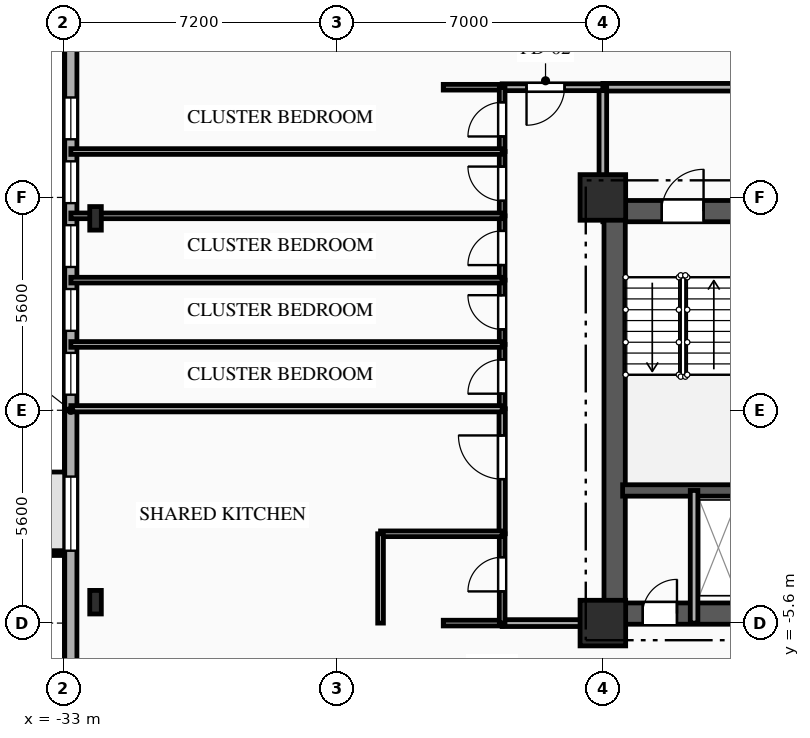
"""IFC4 building model, lengths in metres.
Left out: names, types, materials, properties, quantities, classifications, styles, units other than length and angle.
Written with IfcOpenShell. Run it as: python <this file> out.ifc"""

import sys

from ifc_helpers import new_model, si_unit, direction, frame, frame_2d, origin, origin_2d, place, context, subcontext, project, spatial, rectangle, i_section, extrude, element, fill, save


model = new_model("IFC4")
c1 = context("Model", 3, precision=1e-05, world=origin(), true_north=direction((0.0, 1.0)))
c2 = subcontext(c1, "Body", "Model", "MODEL_VIEW")
j1 = project(units=[si_unit("LENGTHUNIT", "METRE"), si_unit("PLANEANGLEUNIT", "RADIAN")], contexts=[c1])
p1 = place(None, origin())
s1 = spatial("IfcSite", under=j1, at=p1, CompositionType="ELEMENT")
p2 = place(p1, origin())
s2 = spatial("IfcBuilding", under=s1, at=p2, CompositionType="ELEMENT")
p3 = place(p2, frame((0.0, 0.0, 30.35)))
s3 = spatial("IfcBuildingStorey", under=s2, at=p3, CompositionType="ELEMENT", Elevation=30.35)
for number, where, z_axis, x_axis in (
    (1, (-18.8, -5.6, 0.0), (0.0, 0.0, 1.0), (1.0, 0.0, 0.0)),
    (2, (-18.8, 5.6, 0.0), (0.0, 0.0, 1.0), (1.0, 0.0, 0.0)),
):
    element("IfcColumn", number, at=place(p3, frame(where, z_axis=z_axis, x_axis=x_axis)), inside=s3, PredefinedType="COLUMN", context=c2, shape_type="SweptSolid", body=[
        extrude(rectangle(XDim=1.2, YDim=1.2, at=origin_2d()), origin(), (0.0, 0.0, 1.0), 3.35),
    ])
for number, where, z_axis, x_axis in (
    (3, (-32.15, 5.05, 0.0), (0.0, 0.0, 1.0), (1.0, 0.0, 0.0)),
    (4, (-32.15, -5.05, 0.0), (0.0, 0.0, 1.0), (1.0, 0.0, 0.0)),
):
    element("IfcColumn", number, at=place(p3, frame(where, z_axis=z_axis, x_axis=x_axis)), inside=s3, PredefinedType="COLUMN", context=c2, shape_type="SweptSolid", body=[
        extrude(i_section(OverallWidth=0.305, OverallDepth=0.62, WebThickness=0.021, FlangeThickness=0.04, FilletRadius=0.027, at=origin_2d()), origin(), (0.0, 0.0, 1.0), 3.35),
    ])
p4 = place(p3, frame((-32.8, -15.8, 0.0), z_axis=(0.0, 0.0, 1.0), x_axis=(0.0, 1.0, 0.0)))
e5 = element("IfcWall", 5, at=p4, inside=s3, PredefinedType="SOLIDWALL", context=c2, shape_type="SweptSolid", body=[
    extrude(rectangle(XDim=31.6, YDim=0.32, at=frame_2d((15.8, 0.0))), origin(), (0.0, 0.0, 1.0), 3.035),
])
p5 = place(p4, frame((12.105, 0.0, 0.85)))
e6 = element("IfcOpeningElement", 6, at=p5, cuts=e5, PredefinedType="OPENING", context=c2, shape_type="SweptSolid", body=[
    extrude(rectangle(XDim=1.95, YDim=1.85, at=frame_2d((0.975, 0.925))), frame((0.0, 0.17, 0.0), z_axis=(0.0, -1.0, 0.0), x_axis=(1.0, 0.0, 0.0)), (0.0, 0.0, 1.0), 0.34),
])
p6 = place(p4, frame((16.21, 0.0, 0.85)))
e7 = element("IfcOpeningElement", 7, at=p6, cuts=e5, PredefinedType="OPENING", context=c2, shape_type="SweptSolid", body=[
    extrude(rectangle(XDim=1.1, YDim=1.85, at=frame_2d((0.55, 0.925))), frame((0.0, 0.17, 0.0), z_axis=(0.0, -1.0, 0.0), x_axis=(1.0, 0.0, 0.0)), (0.0, 0.0, 1.0), 0.34),
])
p7 = place(p4, frame((17.89, 0.0, 0.85)))
e8 = element("IfcOpeningElement", 8, at=p7, cuts=e5, PredefinedType="OPENING", context=c2, shape_type="SweptSolid", body=[
    extrude(rectangle(XDim=1.1, YDim=1.85, at=frame_2d((0.55, 0.925))), frame((0.0, 0.17, 0.0), z_axis=(0.0, -1.0, 0.0), x_axis=(1.0, 0.0, 0.0)), (0.0, 0.0, 1.0), 0.34),
])
p8 = place(p4, frame((19.57, 0.0, 0.85)))
e9 = element("IfcOpeningElement", 9, at=p8, cuts=e5, PredefinedType="OPENING", context=c2, shape_type="SweptSolid", body=[
    extrude(rectangle(XDim=1.1, YDim=1.85, at=frame_2d((0.55, 0.925))), frame((0.0, 0.17, 0.0), z_axis=(0.0, -1.0, 0.0), x_axis=(1.0, 0.0, 0.0)), (0.0, 0.0, 1.0), 0.34),
])
p9 = place(p4, frame((21.25, 0.0, 0.85)))
e10 = element("IfcOpeningElement", 10, at=p9, cuts=e5, PredefinedType="OPENING", context=c2, shape_type="SweptSolid", body=[
    extrude(rectangle(XDim=1.1, YDim=1.85, at=frame_2d((0.55, 0.925))), frame((0.0, 0.17, 0.0), z_axis=(0.0, -1.0, 0.0), x_axis=(1.0, 0.0, 0.0)), (0.0, 0.0, 1.0), 0.34),
])
p10 = place(p4, frame((22.93, 0.0, 0.85)))
e11 = element("IfcOpeningElement", 11, at=p10, cuts=e5, PredefinedType="OPENING", context=c2, shape_type="SweptSolid", body=[
    extrude(rectangle(XDim=1.1, YDim=1.85, at=frame_2d((0.55, 0.925))), frame((0.0, 0.17, 0.0), z_axis=(0.0, -1.0, 0.0), x_axis=(1.0, 0.0, 0.0)), (0.0, 0.0, 1.0), 0.34),
])
p11 = place(p3, frame((-18.8, 5.24, 0.0), z_axis=(0.0, 0.0, 1.0), x_axis=(1.0, 0.0, 0.0)))
e12 = element("IfcWall", 12, at=p11, inside=s3, PredefinedType="SHEAR", context=c2, shape_type="SweptSolid", body=[
    extrude(rectangle(XDim=9.6, YDim=0.56, at=frame_2d((4.8, 0.0))), origin(), (0.0, 0.0, 1.0), 3.035),
])
p12 = place(p11, frame((1.55, 0.0, 0.0)))
e13 = element("IfcOpeningElement", 13, at=p12, cuts=e12, PredefinedType="OPENING", context=c2, shape_type="SweptSolid", body=[
    extrude(rectangle(XDim=1.1, YDim=2.15, at=frame_2d((0.55, 1.075))), frame((0.0, 0.29, 0.0), z_axis=(0.0, -1.0, 0.0), x_axis=(1.0, 0.0, 0.0)), (0.0, 0.0, 1.0), 0.58),
])
p13 = place(p11, frame((4.775, 0.0, 0.0)))
e14 = element("IfcOpeningElement", 14, at=p13, cuts=e12, PredefinedType="OPENING", context=c2, shape_type="SweptSolid", body=[
    extrude(rectangle(XDim=1.05, YDim=2.1, at=frame_2d((0.525, 1.05))), frame((0.0, 0.29, 0.0), z_axis=(0.0, -1.0, 0.0), x_axis=(1.0, 0.0, 0.0)), (0.0, 0.0, 1.0), 0.58),
])
p14 = place(p3, frame((-18.8, -5.35, 0.0), z_axis=(0.0, 0.0, 1.0), x_axis=(1.0, 0.0, 0.0)))
e15 = element("IfcWall", 15, at=p14, inside=s3, PredefinedType="SHEAR", context=c2, shape_type="SweptSolid", body=[
    extrude(rectangle(XDim=9.6, YDim=0.56, at=frame_2d((4.8, 0.0))), origin(), (0.0, 0.0, 1.0), 3.035),
])
p15 = place(p14, frame((1.05, 0.0, 0.0)))
e16 = element("IfcOpeningElement", 16, at=p15, cuts=e15, PredefinedType="OPENING", context=c2, shape_type="SweptSolid", body=[
    extrude(rectangle(XDim=0.9, YDim=2.1, at=frame_2d((0.45, 1.05))), frame((0.0, 0.29, 0.0), z_axis=(0.0, -1.0, 0.0), x_axis=(1.0, 0.0, 0.0)), (0.0, 0.0, 1.0), 0.58),
])
p16 = place(p3, frame((-18.49, -5.05, 0.0), z_axis=(0.0, 0.0, 1.0), x_axis=(0.0, 1.0, 0.0)))
e17 = element("IfcWall", 17, at=p16, inside=s3, PredefinedType="SHEAR", context=c2, shape_type="SweptSolid", body=[
    extrude(rectangle(XDim=10.1, YDim=0.56, at=frame_2d((5.05, 0.0))), origin(), (0.0, 0.0, 1.0), 3.035),
])
p17 = place(p3, frame((-18.28, -2.11, 0.0), z_axis=(0.0, 0.0, 1.0), x_axis=(1.0, 0.0, 0.0)))
e18 = element("IfcWall", 18, at=p17, inside=s3, PredefinedType="SHEAR", context=c2, shape_type="SweptSolid", body=[
    extrude(rectangle(XDim=3.18, YDim=0.3, at=frame_2d((1.59, 0.0))), origin(), (0.0, 0.0, 1.0), 3.035),
])
p18 = place(p3, frame((-16.4, -5.6, 0.0), z_axis=(0.0, 0.0, 1.0), x_axis=(0.0, 1.0, 0.0)))
e19 = element("IfcWall", 19, at=p18, inside=s3, PredefinedType="PARTITIONING", context=c2, shape_type="SweptSolid", body=[
    extrude(rectangle(XDim=3.49, YDim=0.2, at=frame_2d((1.745, 0.0))), origin(), (0.0, 0.0, 1.0), 3.035),
])
p19 = place(p3, frame((-12.0, 8.5, 0.0), z_axis=(0.0, 0.0, 1.0), x_axis=(-1.0, 0.0, 0.0)))
e20 = element("IfcWall", 20, at=p19, inside=s3, PredefinedType="PARTITIONING", context=c2, shape_type="SweptSolid", body=[
    extrude(rectangle(XDim=6.8, YDim=0.2, at=frame_2d((3.4, 0.0))), origin(), (0.0, 0.0, 1.0), 3.035),
])
p20 = place(p19, frame((1.715, 0.0, 0.0)))
e21 = element("IfcOpeningElement", 21, at=p20, cuts=e20, PredefinedType="OPENING", context=c2, shape_type="SweptSolid", body=[
    extrude(rectangle(XDim=1.1, YDim=2.15, at=frame_2d((0.55, 1.075))), frame((0.0, 0.11, 0.0), z_axis=(0.0, -1.0, 0.0), x_axis=(1.0, 0.0, 0.0)), (0.0, 0.0, 1.0), 0.22),
])
p21 = place(p3, frame((-18.8, 8.5, 0.0), z_axis=(0.0, 0.0, 1.0), x_axis=(0.0, -1.0, 0.0)))
e22 = element("IfcWall", 22, at=p21, inside=s3, PredefinedType="PARTITIONING", context=c2, shape_type="SweptSolid", body=[
    extrude(rectangle(XDim=2.9, YDim=0.2, at=frame_2d((1.45, 0.0))), origin(), (0.0, 0.0, 1.0), 2.52),
])
p22 = place(p3, frame((-18.8, 8.5, 0.0), z_axis=(0.0, 0.0, 1.0), x_axis=(-1.0, 0.0, 0.0)))
e23 = element("IfcWall", 23, at=p22, inside=s3, PredefinedType="PARTITIONING", context=c2, shape_type="SweptSolid", body=[
    extrude(rectangle(XDim=2.65, YDim=0.18, at=frame_2d((1.325, 0.0))), origin(), (0.0, 0.0, 1.0), 3.035),
])
p23 = place(p22, frame((1.009, 0.0, 0.0)))
e24 = element("IfcOpeningElement", 24, at=p23, cuts=e23, PredefinedType="OPENING", context=c2, shape_type="SweptSolid", body=[
    extrude(rectangle(XDim=1.0, YDim=2.15, at=frame_2d((0.5, 1.075))), frame((0.0, 0.1, 0.0), z_axis=(0.0, -1.0, 0.0), x_axis=(1.0, 0.0, 0.0)), (0.0, 0.0, 1.0), 0.2),
])
p24 = place(p3, frame((-21.45, 8.5, 0.0), z_axis=(0.0, 0.0, 1.0), x_axis=(-1.0, 0.0, 0.0)))
e25 = element("IfcWall", 25, at=p24, inside=s3, PredefinedType="PARTITIONING", context=c2, shape_type="SweptSolid", body=[
    extrude(rectangle(XDim=1.55, YDim=0.15, at=frame_2d((0.775, 0.0))), origin(), (0.0, 0.0, 1.0), 3.035),
])
p25 = place(p3, frame((-21.45, -5.6, 0.0), z_axis=(0.0, 0.0, 1.0), x_axis=(1.0, 0.0, 0.0)))
e26 = element("IfcWall", 26, at=p25, inside=s3, PredefinedType="PARTITIONING", context=c2, shape_type="SweptSolid", body=[
    extrude(rectangle(XDim=2.65, YDim=0.18, at=frame_2d((1.325, 0.0))), origin(), (0.0, 0.0, 1.0), 3.035),
])
p26 = place(p3, frame((-23.0, -5.6, 0.0), z_axis=(0.0, 0.0, 1.0), x_axis=(1.0, 0.0, 0.0)))
e27 = element("IfcWall", 27, at=p26, inside=s3, PredefinedType="PLUMBINGWALL", context=c2, shape_type="SweptSolid", body=[
    extrude(rectangle(XDim=1.55, YDim=0.15, at=frame_2d((0.775, 0.0))), origin(), (0.0, 0.0, 1.0), 3.035),
])
p27 = place(p3, frame((-21.45, -5.6, 0.0), z_axis=(0.0, 0.0, 1.0), x_axis=(0.0, 1.0, 0.0)))
e28 = element("IfcWall", 28, at=p27, inside=s3, PredefinedType="PLUMBINGWALL", context=c2, shape_type="SweptSolid", body=[
    extrude(rectangle(XDim=2.35, YDim=0.15, at=frame_2d((1.175, 0.0))), origin(), (0.0, 0.0, 1.0), 3.035),
])
p28 = place(p27, frame((0.834, 0.0, 0.0)))
e29 = element("IfcOpeningElement", 29, at=p28, cuts=e28, PredefinedType="OPENING", context=c2, shape_type="SweptSolid", body=[
    extrude(rectangle(XDim=0.9, YDim=2.1, at=frame_2d((0.45, 1.05))), frame((0.0, 0.085, 0.0), z_axis=(0.0, -1.0, 0.0), x_axis=(1.0, 0.0, 0.0)), (0.0, 0.0, 1.0), 0.17),
])
p29 = place(p3, frame((-21.45, -3.25, 0.0), z_axis=(0.0, 0.0, 1.0), x_axis=(0.0, 1.0, 0.0)))
e30 = element("IfcWall", 30, at=p29, inside=s3, PredefinedType="PARTITIONING", context=c2, shape_type="SweptSolid", body=[
    extrude(rectangle(XDim=3.29, YDim=0.165, at=frame_2d((1.645, 0.0))), origin(), (0.0, 0.0, 1.0), 3.035),
])
p30 = place(p29, frame((1.438, 0.0, 0.0)))
e31 = element("IfcOpeningElement", 31, at=p30, cuts=e30, PredefinedType="OPENING", context=c2, shape_type="SweptSolid", body=[
    extrude(rectangle(XDim=1.15, YDim=2.15, at=frame_2d((0.575, 1.075))), frame((0.0, 0.093, 0.0), z_axis=(0.0, -1.0, 0.0), x_axis=(1.0, 0.0, 0.0)), (0.0, 0.0, 1.0), 0.185),
])
p31 = place(p3, frame((-21.45, 0.04, 0.0), z_axis=(0.0, 0.0, 1.0), x_axis=(0.0, 1.0, 0.0)))
e32 = element("IfcWall", 32, at=p31, inside=s3, PredefinedType="PARTITIONING", context=c2, shape_type="SweptSolid", body=[
    extrude(rectangle(XDim=1.692, YDim=0.15, at=frame_2d((0.846, 0.0))), origin(), (0.0, 0.0, 1.0), 3.035),
])
p32 = place(p31, frame((0.396, 0.0, 0.0)))
e33 = element("IfcOpeningElement", 33, at=p32, cuts=e32, PredefinedType="OPENING", context=c2, shape_type="SweptSolid", body=[
    extrude(rectangle(XDim=0.9, YDim=2.1, at=frame_2d((0.45, 1.05))), frame((0.0, 0.085, 0.0), z_axis=(0.0, -1.0, 0.0), x_axis=(1.0, 0.0, 0.0)), (0.0, 0.0, 1.0), 0.17),
])
p33 = place(p3, frame((-21.45, 1.732, 0.0), z_axis=(0.0, 0.0, 1.0), x_axis=(0.0, 1.0, 0.0)))
e34 = element("IfcWall", 34, at=p33, inside=s3, PredefinedType="PARTITIONING", context=c2, shape_type="SweptSolid", body=[
    extrude(rectangle(XDim=1.692, YDim=0.15, at=frame_2d((0.846, 0.0))), origin(), (0.0, 0.0, 1.0), 3.035),
])
p34 = place(p33, frame((0.396, 0.0, 0.0)))
e35 = element("IfcOpeningElement", 35, at=p34, cuts=e34, PredefinedType="OPENING", context=c2, shape_type="SweptSolid", body=[
    extrude(rectangle(XDim=0.9, YDim=2.1, at=frame_2d((0.45, 1.05))), frame((0.0, 0.085, 0.0), z_axis=(0.0, -1.0, 0.0), x_axis=(1.0, 0.0, 0.0)), (0.0, 0.0, 1.0), 0.17),
])
p35 = place(p3, frame((-21.45, 3.424, 0.0), z_axis=(0.0, 0.0, 1.0), x_axis=(0.0, 1.0, 0.0)))
e36 = element("IfcWall", 36, at=p35, inside=s3, PredefinedType="PARTITIONING", context=c2, shape_type="SweptSolid", body=[
    extrude(rectangle(XDim=1.692, YDim=0.15, at=frame_2d((0.846, 0.0))), origin(), (0.0, 0.0, 1.0), 3.035),
])
p36 = place(p35, frame((0.396, 0.0, 0.0)))
e37 = element("IfcOpeningElement", 37, at=p36, cuts=e36, PredefinedType="OPENING", context=c2, shape_type="SweptSolid", body=[
    extrude(rectangle(XDim=0.9, YDim=2.1, at=frame_2d((0.45, 1.05))), frame((0.0, 0.085, 0.0), z_axis=(0.0, -1.0, 0.0), x_axis=(1.0, 0.0, 0.0)), (0.0, 0.0, 1.0), 0.17),
])
p37 = place(p3, frame((-21.45, 5.116, 0.0), z_axis=(0.0, 0.0, 1.0), x_axis=(0.0, 1.0, 0.0)))
e38 = element("IfcWall", 38, at=p37, inside=s3, PredefinedType="PARTITIONING", context=c2, shape_type="SweptSolid", body=[
    extrude(rectangle(XDim=1.692, YDim=0.15, at=frame_2d((0.846, 0.0))), origin(), (0.0, 0.0, 1.0), 3.035),
])
p38 = place(p37, frame((0.396, 0.0, 0.0)))
e39 = element("IfcOpeningElement", 39, at=p38, cuts=e38, PredefinedType="OPENING", context=c2, shape_type="SweptSolid", body=[
    extrude(rectangle(XDim=0.9, YDim=2.1, at=frame_2d((0.45, 1.05))), frame((0.0, 0.085, 0.0), z_axis=(0.0, -1.0, 0.0), x_axis=(1.0, 0.0, 0.0)), (0.0, 0.0, 1.0), 0.17),
])
p39 = place(p3, frame((-21.45, 6.808, 0.0), z_axis=(0.0, 0.0, 1.0), x_axis=(0.0, 1.0, 0.0)))
e40 = element("IfcWall", 40, at=p39, inside=s3, PredefinedType="PARTITIONING", context=c2, shape_type="SweptSolid", body=[
    extrude(rectangle(XDim=1.692, YDim=0.15, at=frame_2d((0.846, 0.0))), origin(), (0.0, 0.0, 1.0), 3.035),
])
p40 = place(p39, frame((0.396, 0.0, 0.0)))
e41 = element("IfcOpeningElement", 41, at=p40, cuts=e40, PredefinedType="OPENING", context=c2, shape_type="SweptSolid", body=[
    extrude(rectangle(XDim=0.9, YDim=2.1, at=frame_2d((0.45, 1.05))), frame((0.0, 0.085, 0.0), z_axis=(0.0, -1.0, 0.0), x_axis=(1.0, 0.0, 0.0)), (0.0, 0.0, 1.0), 0.17),
])
p41 = place(p3, frame((-24.65, -3.25, 0.0), z_axis=(0.0, 0.0, 1.0), x_axis=(1.0, 0.0, 0.0)))
e42 = element("IfcWall", 42, at=p41, inside=s3, PredefinedType="PLUMBINGWALL", context=c2, shape_type="SweptSolid", body=[
    extrude(rectangle(XDim=3.2, YDim=0.15, at=frame_2d((1.6, 0.0))), origin(), (0.0, 0.0, 1.0), 2.52),
])
p42 = place(p3, frame((-24.65, -5.6, 0.0), z_axis=(0.0, 0.0, 1.0), x_axis=(0.0, 1.0, 0.0)))
e43 = element("IfcWall", 43, at=p42, inside=s3, PredefinedType="PLUMBINGWALL", context=c2, shape_type="SweptSolid", body=[
    extrude(rectangle(XDim=2.35, YDim=0.15, at=frame_2d((1.175, 0.0))), origin(), (0.0, 0.0, 1.0), 3.035),
])
p43 = place(p3, frame((-32.8, 0.04, 0.0), z_axis=(0.0, 0.0, 1.0), x_axis=(1.0, 0.0, 0.0)))
e44 = element("IfcWall", 44, at=p43, inside=s3, PredefinedType="PARTITIONING", context=c2, shape_type="SweptSolid", body=[
    extrude(rectangle(XDim=11.35, YDim=0.165, at=frame_2d((5.675, 0.0))), origin(), (0.0, 0.0, 1.0), 3.035),
])
p44 = place(p3, frame((-32.8, 1.732, 0.0), z_axis=(0.0, 0.0, 1.0), x_axis=(1.0, 0.0, 0.0)))
e45 = element("IfcWall", 45, at=p44, inside=s3, PredefinedType="PARTITIONING", context=c2, shape_type="SweptSolid", body=[
    extrude(rectangle(XDim=11.35, YDim=0.15, at=frame_2d((5.675, 0.0))), origin(), (0.0, 0.0, 1.0), 3.035),
])
for number, where, z_axis, x_axis in (
    (46, (-32.8, 3.424, 0.0), (0.0, 0.0, 1.0), (1.0, 0.0, 0.0)),
    (47, (-32.8, 5.116, 0.0), (0.0, 0.0, 1.0), (1.0, 0.0, 0.0)),
):
    element("IfcWall", number, at=place(p3, frame(where, z_axis=z_axis, x_axis=x_axis)), inside=s3, PredefinedType="PARTITIONING", context=c2, shape_type="SweptSolid", body=[
        extrude(rectangle(XDim=11.35, YDim=0.15, at=frame_2d((5.675, 0.0))), origin(), (0.0, 0.0, 1.0), 2.52),
    ])
p45 = place(p3, frame((-32.8, 6.808, 0.0), z_axis=(0.0, 0.0, 1.0), x_axis=(1.0, 0.0, 0.0)))
e48 = element("IfcWall", 48, at=p45, inside=s3, PredefinedType="PARTITIONING", context=c2, shape_type="SweptSolid", body=[
    extrude(rectangle(XDim=11.35, YDim=0.15, at=frame_2d((5.675, 0.0))), origin(), (0.0, 0.0, 1.0), 3.035),
])
p46 = place(p5, origin())
e49 = element("IfcWindow", 49, at=p46, inside=s3, PartitioningType="SINGLE_PANEL", PredefinedType="WINDOW", context=c2, shape_type="SweptSolid", body=[
    extrude(rectangle(XDim=1.95, YDim=1.85, at=frame_2d((0.975, 0.925))), frame((0.0, 0.03, 0.0), z_axis=(0.0, -1.0, 0.0), x_axis=(1.0, 0.0, 0.0)), (0.0, 0.0, 1.0), 0.06),
])
fill(e6, e49)
p47 = place(p6, origin())
e50 = element("IfcWindow", 50, at=p47, inside=s3, PartitioningType="SINGLE_PANEL", PredefinedType="WINDOW", context=c2, shape_type="SweptSolid", body=[
    extrude(rectangle(XDim=1.1, YDim=1.85, at=frame_2d((0.55, 0.925))), frame((0.0, 0.03, 0.0), z_axis=(0.0, -1.0, 0.0), x_axis=(1.0, 0.0, 0.0)), (0.0, 0.0, 1.0), 0.06),
])
fill(e7, e50)
p48 = place(p7, origin())
e51 = element("IfcWindow", 51, at=p48, inside=s3, PartitioningType="SINGLE_PANEL", PredefinedType="WINDOW", context=c2, shape_type="SweptSolid", body=[
    extrude(rectangle(XDim=1.1, YDim=1.85, at=frame_2d((0.55, 0.925))), frame((0.0, 0.03, 0.0), z_axis=(0.0, -1.0, 0.0), x_axis=(1.0, 0.0, 0.0)), (0.0, 0.0, 1.0), 0.06),
])
fill(e8, e51)
p49 = place(p8, origin())
e52 = element("IfcWindow", 52, at=p49, inside=s3, PartitioningType="SINGLE_PANEL", PredefinedType="WINDOW", context=c2, shape_type="SweptSolid", body=[
    extrude(rectangle(XDim=1.1, YDim=1.85, at=frame_2d((0.55, 0.925))), frame((0.0, 0.03, 0.0), z_axis=(0.0, -1.0, 0.0), x_axis=(1.0, 0.0, 0.0)), (0.0, 0.0, 1.0), 0.06),
])
fill(e9, e52)
p50 = place(p9, origin())
e53 = element("IfcWindow", 53, at=p50, inside=s3, PartitioningType="SINGLE_PANEL", PredefinedType="WINDOW", context=c2, shape_type="SweptSolid", body=[
    extrude(rectangle(XDim=1.1, YDim=1.85, at=frame_2d((0.55, 0.925))), frame((0.0, 0.03, 0.0), z_axis=(0.0, -1.0, 0.0), x_axis=(1.0, 0.0, 0.0)), (0.0, 0.0, 1.0), 0.06),
])
fill(e10, e53)
p51 = place(p10, origin())
e54 = element("IfcWindow", 54, at=p51, inside=s3, PartitioningType="SINGLE_PANEL", PredefinedType="WINDOW", context=c2, shape_type="SweptSolid", body=[
    extrude(rectangle(XDim=1.1, YDim=1.85, at=frame_2d((0.55, 0.925))), frame((0.0, 0.03, 0.0), z_axis=(0.0, -1.0, 0.0), x_axis=(1.0, 0.0, 0.0)), (0.0, 0.0, 1.0), 0.06),
])
fill(e11, e54)
p52 = place(p12, origin())
e55 = element("IfcDoor", 55, at=p52, inside=s3, OperationType="SINGLE_SWING_RIGHT", PredefinedType="DOOR", context=c2, shape_type="SweptSolid", body=[
    extrude(rectangle(XDim=1.1, YDim=2.15, at=frame_2d((0.55, 1.075))), frame((0.0, 0.025, 0.0), z_axis=(0.0, -1.0, 0.0), x_axis=(1.0, 0.0, 0.0)), (0.0, 0.0, 1.0), 0.05),
])
fill(e13, e55)
p53 = place(p15, origin())
e56 = element("IfcDoor", 56, at=p53, inside=s3, OperationType="SINGLE_SWING_RIGHT", PredefinedType="DOOR", context=c2, shape_type="SweptSolid", body=[
    extrude(rectangle(XDim=0.9, YDim=2.1, at=frame_2d((0.45, 1.05))), frame((0.0, 0.025, 0.0), z_axis=(0.0, -1.0, 0.0), x_axis=(1.0, 0.0, 0.0)), (0.0, 0.0, 1.0), 0.05),
])
fill(e16, e56)
p54 = place(p23, origin())
e57 = element("IfcDoor", 57, at=p54, inside=s3, OperationType="SINGLE_SWING_RIGHT", PredefinedType="DOOR", context=c2, shape_type="SweptSolid", body=[
    extrude(rectangle(XDim=1.0, YDim=2.15, at=frame_2d((0.5, 1.075))), frame((0.0, 0.025, 0.0), z_axis=(0.0, -1.0, 0.0), x_axis=(1.0, 0.0, 0.0)), (0.0, 0.0, 1.0), 0.05),
])
fill(e24, e57)
p55 = place(p28, origin())
e58 = element("IfcDoor", 58, at=p55, inside=s3, OperationType="SINGLE_SWING_LEFT", PredefinedType="DOOR", context=c2, shape_type="SweptSolid", body=[
    extrude(rectangle(XDim=0.9, YDim=2.1, at=frame_2d((0.45, 1.05))), frame((0.0, 0.025, 0.0), z_axis=(0.0, -1.0, 0.0), x_axis=(1.0, 0.0, 0.0)), (0.0, 0.0, 1.0), 0.05),
])
fill(e29, e58)
p56 = place(p30, origin())
e59 = element("IfcDoor", 59, at=p56, inside=s3, OperationType="SINGLE_SWING_RIGHT", PredefinedType="DOOR", context=c2, shape_type="SweptSolid", body=[
    extrude(rectangle(XDim=1.15, YDim=2.15, at=frame_2d((0.575, 1.075))), frame((0.0, 0.025, 0.0), z_axis=(0.0, -1.0, 0.0), x_axis=(1.0, 0.0, 0.0)), (0.0, 0.0, 1.0), 0.05),
])
fill(e31, e59)
p57 = place(p32, origin())
e60 = element("IfcDoor", 60, at=p57, inside=s3, OperationType="SINGLE_SWING_LEFT", PredefinedType="DOOR", context=c2, shape_type="SweptSolid", body=[
    extrude(rectangle(XDim=0.9, YDim=2.1, at=frame_2d((0.45, 1.05))), frame((0.0, 0.025, 0.0), z_axis=(0.0, -1.0, 0.0), x_axis=(1.0, 0.0, 0.0)), (0.0, 0.0, 1.0), 0.05),
])
fill(e33, e60)
p58 = place(p34, origin())
e61 = element("IfcDoor", 61, at=p58, inside=s3, OperationType="SINGLE_SWING_RIGHT", PredefinedType="DOOR", context=c2, shape_type="SweptSolid", body=[
    extrude(rectangle(XDim=0.9, YDim=2.1, at=frame_2d((0.45, 1.05))), frame((0.0, 0.025, 0.0), z_axis=(0.0, -1.0, 0.0), x_axis=(1.0, 0.0, 0.0)), (0.0, 0.0, 1.0), 0.05),
])
fill(e35, e61)
p59 = place(p36, origin())
e62 = element("IfcDoor", 62, at=p59, inside=s3, OperationType="SINGLE_SWING_LEFT", PredefinedType="DOOR", context=c2, shape_type="SweptSolid", body=[
    extrude(rectangle(XDim=0.9, YDim=2.1, at=frame_2d((0.45, 1.05))), frame((0.0, 0.025, 0.0), z_axis=(0.0, -1.0, 0.0), x_axis=(1.0, 0.0, 0.0)), (0.0, 0.0, 1.0), 0.05),
])
fill(e37, e62)
p60 = place(p38, origin())
e63 = element("IfcDoor", 63, at=p60, inside=s3, OperationType="SINGLE_SWING_RIGHT", PredefinedType="DOOR", context=c2, shape_type="SweptSolid", body=[
    extrude(rectangle(XDim=0.9, YDim=2.1, at=frame_2d((0.45, 1.05))), frame((0.0, 0.025, 0.0), z_axis=(0.0, -1.0, 0.0), x_axis=(1.0, 0.0, 0.0)), (0.0, 0.0, 1.0), 0.05),
])
fill(e39, e63)
p61 = place(p40, origin())
e64 = element("IfcDoor", 64, at=p61, inside=s3, OperationType="SINGLE_SWING_LEFT", PredefinedType="DOOR", context=c2, shape_type="SweptSolid", body=[
    extrude(rectangle(XDim=0.9, YDim=2.1, at=frame_2d((0.45, 1.05))), frame((0.0, 0.025, 0.0), z_axis=(0.0, -1.0, 0.0), x_axis=(1.0, 0.0, 0.0)), (0.0, 0.0, 1.0), 0.05),
])
fill(e41, e64)
save(model, sys.argv[1])
